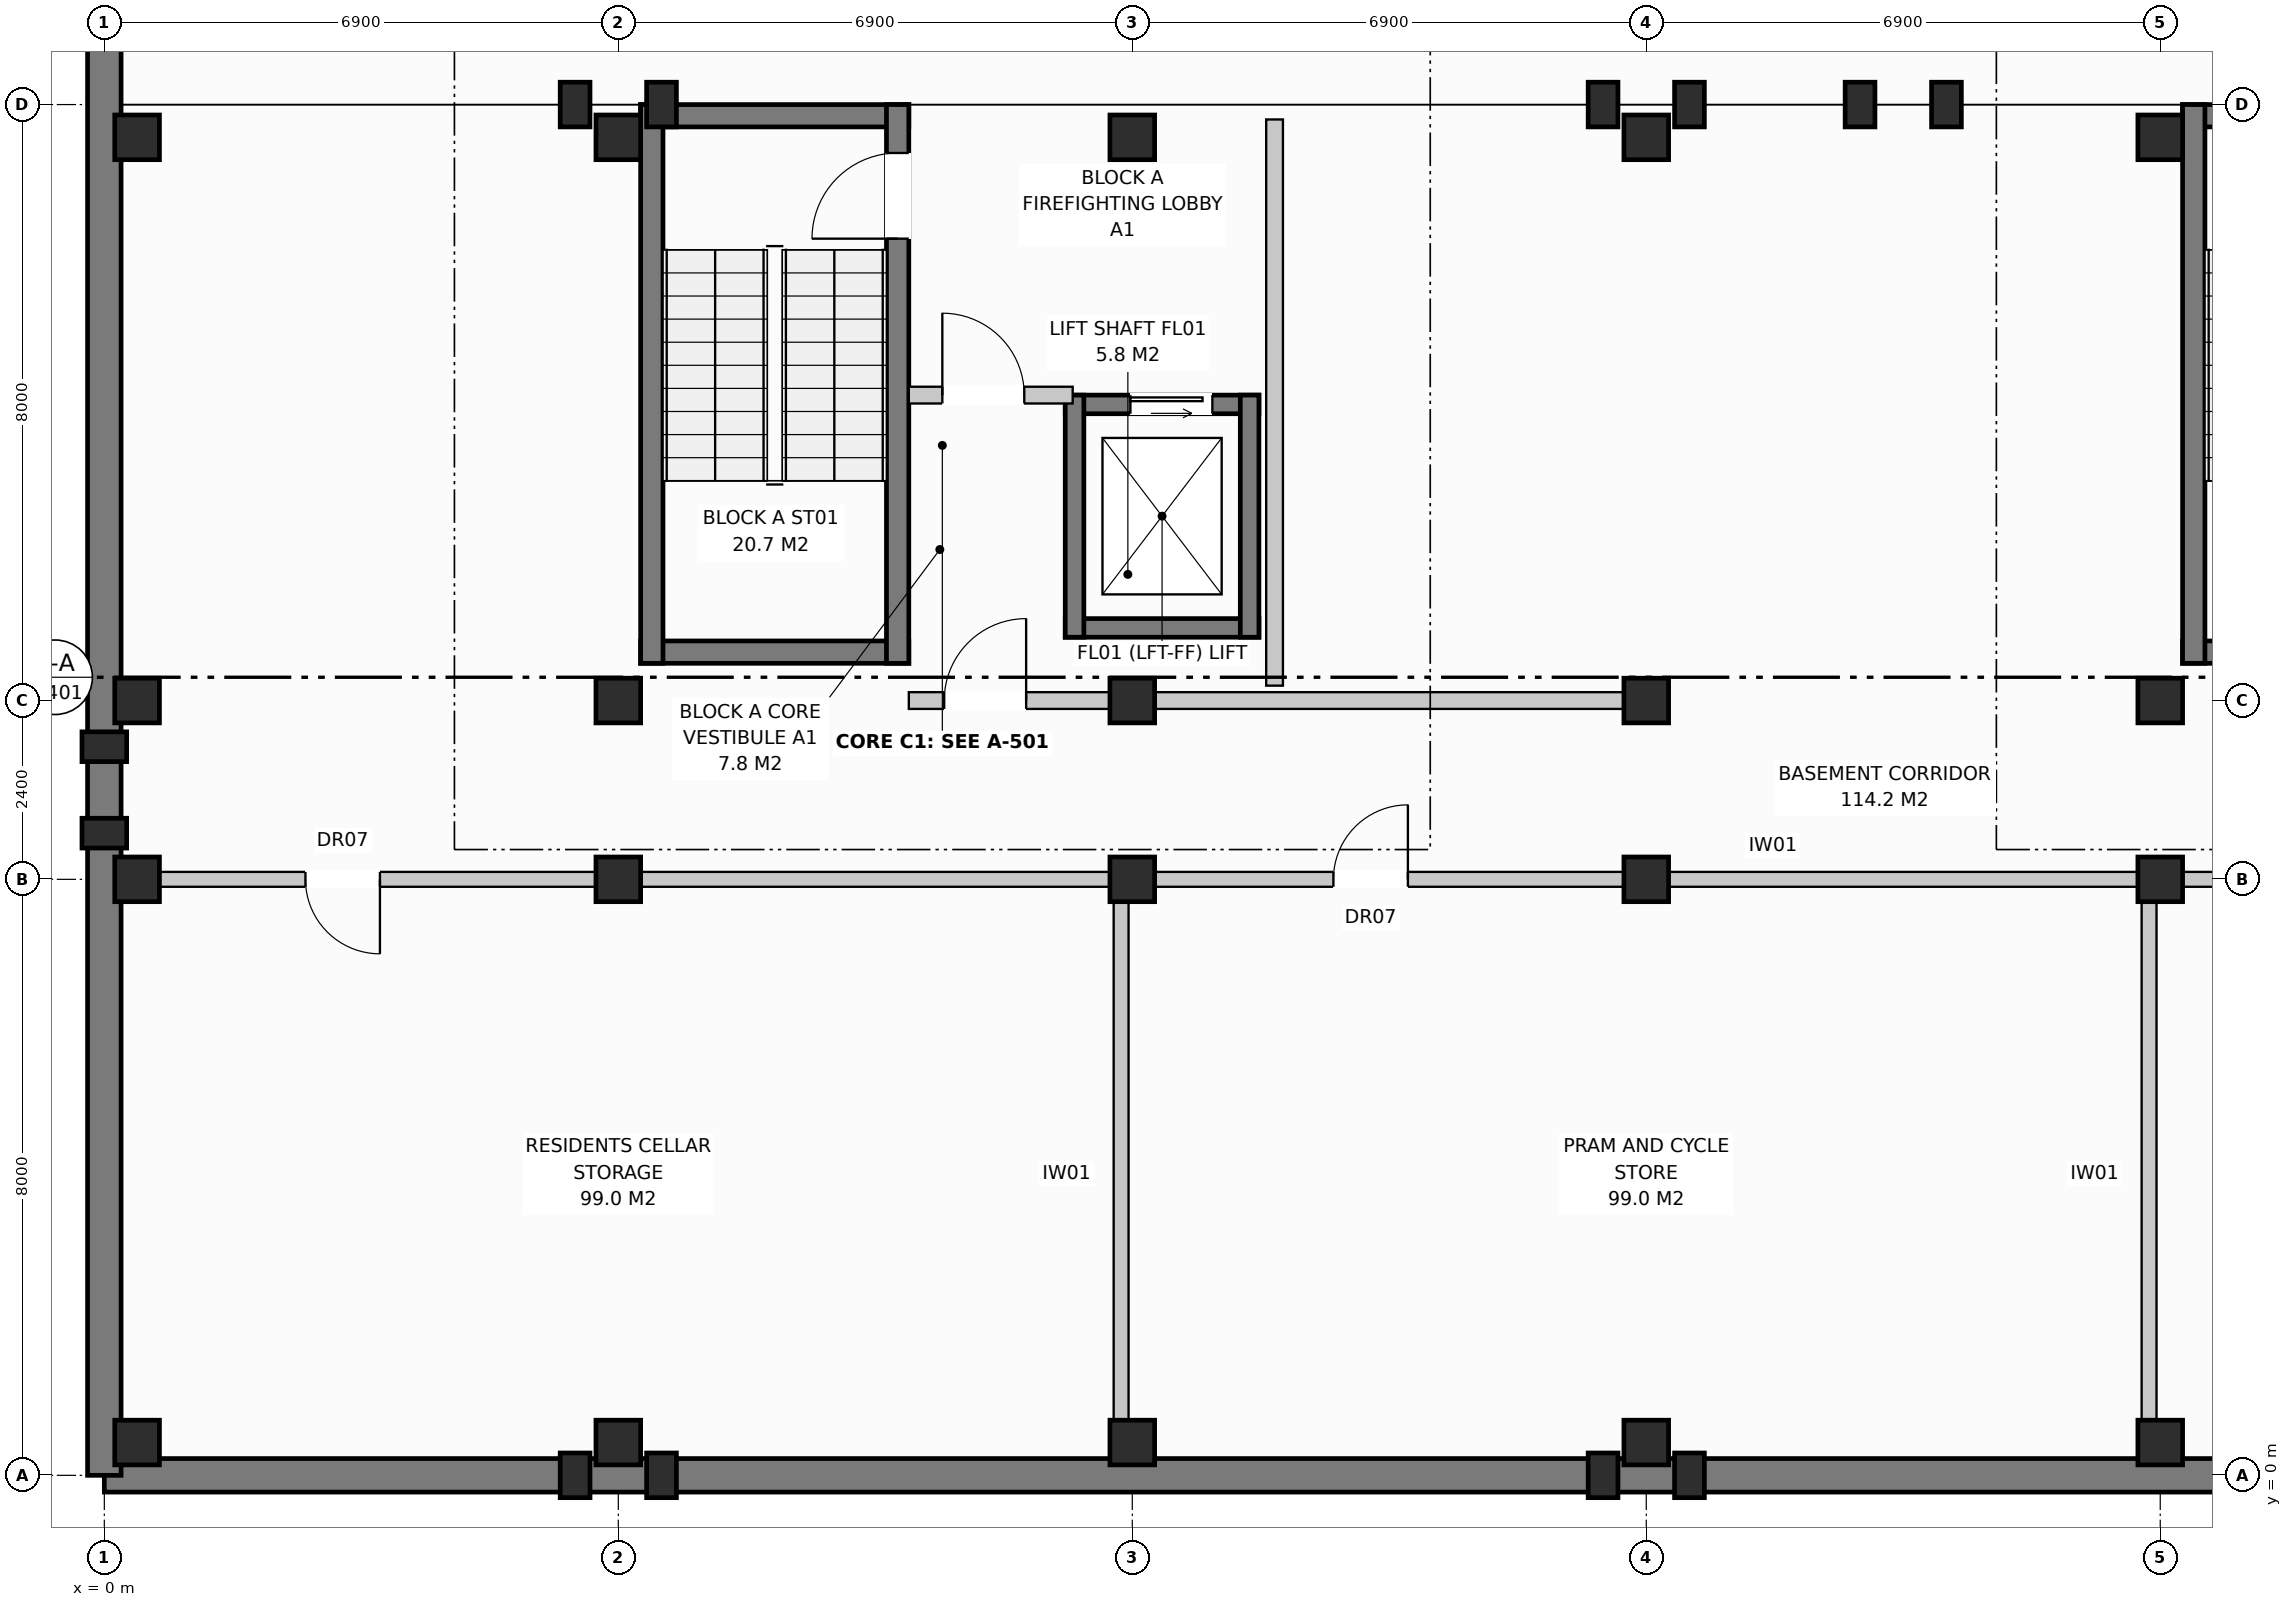
"""IFC4 building model, lengths in metres.
Left out: names, types, materials, properties, quantities, classifications, styles, units other than length and angle.
Written with IfcOpenShell. Run it as: python <this file> out.ifc"""

import sys

from ifc_helpers import new_model, si_unit, direction, frame, frame_2d, origin, origin_with_axes, origin_2d, place, context, subcontext, project, spatial, rectangle, extrude, element, fill, save


model = new_model("IFC4")
c1 = context("Model", 3, precision=1e-05, world=origin(), true_north=direction((0.0, 1.0)))
c2 = subcontext(c1, "Body", "Model", "MODEL_VIEW")
j1 = project(units=[si_unit("LENGTHUNIT", "METRE"), si_unit("PLANEANGLEUNIT", "RADIAN")], contexts=[c1])
p1 = place(None, origin())
s1 = spatial("IfcSite", under=j1, at=p1, CompositionType="ELEMENT")
p2 = place(p1, origin())
s2 = spatial("IfcBuilding", under=s1, at=p2, CompositionType="ELEMENT")
p3 = place(p2, frame((0.0, 0.0, -3.8)))
s3 = spatial("IfcBuildingStorey", under=s2, at=p3, CompositionType="ELEMENT", Elevation=-3.8)
for number, where, z_axis, x_axis in (
    (1, (0.44, 0.44, 0.0), (0.0, 0.0, 1.0), (1.0, 0.0, 0.0)),
    (2, (0.44, 8.0, 0.0), (0.0, 0.0, 1.0), (1.0, 0.0, 0.0)),
    (3, (0.44, 10.4, 0.0), (0.0, 0.0, 1.0), (1.0, 0.0, 0.0)),
    (4, (0.44, 17.96, 0.0), (0.0, 0.0, 1.0), (1.0, 0.0, 0.0)),
    (5, (6.9, 0.44, 0.0), (0.0, 0.0, 1.0), (1.0, 0.0, 0.0)),
    (6, (6.9, 8.0, 0.0), (0.0, 0.0, 1.0), (1.0, 0.0, 0.0)),
    (7, (6.9, 10.4, 0.0), (0.0, 0.0, 1.0), (1.0, 0.0, 0.0)),
    (8, (6.9, 17.96, 0.0), (0.0, 0.0, 1.0), (1.0, 0.0, 0.0)),
    (9, (13.8, 0.44, 0.0), (0.0, 0.0, 1.0), (1.0, 0.0, 0.0)),
    (10, (13.8, 8.0, 0.0), (0.0, 0.0, 1.0), (1.0, 0.0, 0.0)),
    (11, (13.8, 10.4, 0.0), (0.0, 0.0, 1.0), (1.0, 0.0, 0.0)),
    (12, (13.8, 17.96, 0.0), (0.0, 0.0, 1.0), (1.0, 0.0, 0.0)),
    (13, (20.7, 0.44, 0.0), (0.0, 0.0, 1.0), (1.0, 0.0, 0.0)),
    (14, (20.7, 8.0, 0.0), (0.0, 0.0, 1.0), (1.0, 0.0, 0.0)),
    (15, (20.7, 10.4, 0.0), (0.0, 0.0, 1.0), (1.0, 0.0, 0.0)),
    (16, (20.7, 17.96, 0.0), (0.0, 0.0, 1.0), (1.0, 0.0, 0.0)),
    (17, (27.6, 0.44, 0.0), (0.0, 0.0, 1.0), (1.0, 0.0, 0.0)),
    (18, (27.6, 8.0, 0.0), (0.0, 0.0, 1.0), (1.0, 0.0, 0.0)),
    (19, (27.6, 10.4, 0.0), (0.0, 0.0, 1.0), (1.0, 0.0, 0.0)),
    (20, (27.6, 17.96, 0.0), (0.0, 0.0, 1.0), (1.0, 0.0, 0.0)),
):
    element("IfcColumn", number, at=place(p3, frame(where, z_axis=z_axis, x_axis=x_axis)), inside=s3, PredefinedType="COLUMN", context=c2, shape_type="SweptSolid", body=[
        extrude(rectangle(XDim=0.6, YDim=0.6, at=origin_2d()), origin(), (0.0, 0.0, 1.0), 3.8),
    ])
for number, where, z_axis, x_axis in (
    (21, (6.32, 0.0, 0.0), (0.0, 0.0, 1.0), (1.0, 0.0, 0.0)),
    (22, (6.32, 18.4, 0.0), (0.0, 0.0, 1.0), (1.0, 0.0, 0.0)),
    (23, (7.48, 0.0, 0.0), (0.0, 0.0, 1.0), (1.0, 0.0, 0.0)),
    (24, (7.48, 18.4, 0.0), (0.0, 0.0, 1.0), (1.0, 0.0, 0.0)),
    (25, (20.12, 0.0, 0.0), (0.0, 0.0, 1.0), (1.0, 0.0, 0.0)),
    (26, (20.12, 18.4, 0.0), (0.0, 0.0, 1.0), (1.0, 0.0, 0.0)),
    (27, (21.28, 0.0, 0.0), (0.0, 0.0, 1.0), (1.0, 0.0, 0.0)),
    (28, (21.28, 18.4, 0.0), (0.0, 0.0, 1.0), (1.0, 0.0, 0.0)),
    (29, (23.57, 18.4, 0.0), (0.0, 0.0, 1.0), (1.0, 0.0, 0.0)),
    (30, (24.73, 18.4, 0.0), (0.0, 0.0, 1.0), (1.0, 0.0, 0.0)),
    (31, (0.0, 8.62, 0.0), (0.0, 0.0, 1.0), (0.0, 1.0, 0.0)),
    (32, (0.0, 9.78, 0.0), (0.0, 0.0, 1.0), (0.0, 1.0, 0.0)),
):
    element("IfcColumn", number, at=place(p3, frame(where, z_axis=z_axis, x_axis=x_axis)), inside=s3, PredefinedType="PILASTER", context=c2, shape_type="SweptSolid", body=[
        extrude(rectangle(XDim=0.4, YDim=0.6, at=origin_2d()), origin(), (0.0, 0.0, 1.0), 3.8),
    ])
p4 = place(p3, origin_with_axes())
e33 = element("IfcWall", 33, at=p4, inside=s3, PredefinedType="STANDARD", context=c2, shape_type="SweptSolid", body=[
    extrude(rectangle(XDim=168.0, YDim=0.45, at=frame_2d((84.0, 0.0))), origin(), (0.0, 0.0, 1.0), 3.48),
])
p5 = place(p3, frame((0.0, 116.0, 0.0), z_axis=(0.0, 0.0, 1.0), x_axis=(0.0, -1.0, 0.0)))
e34 = element("IfcWall", 34, at=p5, inside=s3, PredefinedType="STANDARD", context=c2, shape_type="SweptSolid", body=[
    extrude(rectangle(XDim=116.0, YDim=0.45, at=frame_2d((58.0, 0.0))), origin(), (0.0, 0.0, 1.0), 3.48),
])
for number, where, z_axis, x_axis in (
    (35, (7.2, 18.25, 0.0), (0.0, 0.0, 1.0), (1.0, 0.0, 0.0)),
    (36, (7.2, 11.05, 0.0), (0.0, 0.0, 1.0), (1.0, 0.0, 0.0)),
):
    element("IfcWall", number, at=place(p3, frame(where, z_axis=z_axis, x_axis=x_axis)), inside=s3, PredefinedType="SHEAR", context=c2, shape_type="SweptSolid", body=[
        extrude(rectangle(XDim=3.6, YDim=0.3, at=frame_2d((1.8, 0.0))), origin(), (0.0, 0.0, 1.0), 3.48),
    ])
p6 = place(p3, frame((7.35, 10.9, 0.0), z_axis=(0.0, 0.0, 1.0), x_axis=(0.0, 1.0, 0.0)))
e37 = element("IfcWall", 37, at=p6, inside=s3, PredefinedType="SHEAR", context=c2, shape_type="SweptSolid", body=[
    extrude(rectangle(XDim=7.5, YDim=0.3, at=frame_2d((3.75, 0.0))), origin(), (0.0, 0.0, 1.0), 3.48),
])
p7 = place(p3, frame((10.65, 10.9, 0.0), z_axis=(0.0, 0.0, 1.0), x_axis=(0.0, 1.0, 0.0)))
e38 = element("IfcWall", 38, at=p7, inside=s3, PredefinedType="SHEAR", context=c2, shape_type="SweptSolid", body=[
    extrude(rectangle(XDim=7.5, YDim=0.3, at=frame_2d((3.75, 0.0))), origin(), (0.0, 0.0, 1.0), 3.48),
])
p8 = place(p7, frame((5.7, 0.0, 0.0)))
e39 = element("IfcOpeningElement", 39, at=p8, cuts=e38, PredefinedType="OPENING", context=c2, shape_type="SweptSolid", body=[
    extrude(rectangle(XDim=1.15, YDim=2.15, at=frame_2d((0.575, 1.075))), frame((0.0, 0.162, 0.0), z_axis=(0.0, -1.0, 0.0), x_axis=(1.0, 0.0, 0.0)), (0.0, 0.0, 1.0), 0.324),
])
p9 = place(p3, frame((12.9, 14.375, 0.0), z_axis=(0.0, 0.0, 1.0), x_axis=(1.0, 0.0, 0.0)))
e40 = element("IfcWall", 40, at=p9, inside=s3, PredefinedType="SHEAR", context=c2, shape_type="SweptSolid", body=[
    extrude(rectangle(XDim=2.6, YDim=0.25, at=frame_2d((1.3, 0.0))), origin(), (0.0, 0.0, 1.0), 3.48),
])
p10 = place(p9, frame((0.875, 0.0, 0.0)))
e41 = element("IfcOpeningElement", 41, at=p10, cuts=e40, PredefinedType="OPENING", context=c2, shape_type="SweptSolid", body=[
    extrude(rectangle(XDim=1.1, YDim=2.1, at=frame_2d((0.55, 1.05))), frame((0.0, 0.137, 0.0), z_axis=(0.0, -1.0, 0.0), x_axis=(1.0, 0.0, 0.0)), (0.0, 0.0, 1.0), 0.274),
])
p11 = place(p3, frame((12.9, 11.375, 0.0), z_axis=(0.0, 0.0, 1.0), x_axis=(1.0, 0.0, 0.0)))
e42 = element("IfcWall", 42, at=p11, inside=s3, PredefinedType="SHEAR", context=c2, shape_type="SweptSolid", body=[
    extrude(rectangle(XDim=2.6, YDim=0.25, at=frame_2d((1.3, 0.0))), origin(), (0.0, 0.0, 1.0), 3.48),
])
for number, where, z_axis, x_axis in (
    (43, (13.025, 11.25, 0.0), (0.0, 0.0, 1.0), (0.0, 1.0, 0.0)),
    (44, (15.375, 11.25, 0.0), (0.0, 0.0, 1.0), (0.0, 1.0, 0.0)),
):
    element("IfcWall", number, at=place(p3, frame(where, z_axis=z_axis, x_axis=x_axis)), inside=s3, PredefinedType="SHEAR", context=c2, shape_type="SweptSolid", body=[
        extrude(rectangle(XDim=3.25, YDim=0.25, at=frame_2d((1.625, 0.0))), origin(), (0.0, 0.0, 1.0), 3.48),
    ])
p12 = place(p3, frame((15.71, 10.6, 0.0), z_axis=(0.0, 0.0, 1.0), x_axis=(0.0, 1.0, 0.0)))
e45 = element("IfcWall", 45, at=p12, inside=s3, PredefinedType="PARTITIONING", context=c2, shape_type="SweptSolid", body=[
    extrude(rectangle(XDim=7.6, YDim=0.225, at=frame_2d((3.8, 0.0))), origin(), (0.0, 0.0, 1.0), 3.19),
])
p13 = place(p3, frame((10.8, 14.5, 0.0), z_axis=(0.0, 0.0, 1.0), x_axis=(1.0, 0.0, 0.0)))
e46 = element("IfcWall", 46, at=p13, inside=s3, PredefinedType="PARTITIONING", context=c2, shape_type="SweptSolid", body=[
    extrude(rectangle(XDim=2.2, YDim=0.225, at=frame_2d((1.1, 0.0))), origin(), (0.0, 0.0, 1.0), 3.48),
])
p14 = place(p13, frame((0.45, 0.0, 0.0)))
e47 = element("IfcOpeningElement", 47, at=p14, cuts=e46, PredefinedType="OPENING", context=c2, shape_type="SweptSolid", body=[
    extrude(rectangle(XDim=1.1, YDim=2.15, at=frame_2d((0.55, 1.075))), frame((0.0, 0.125, 0.0), z_axis=(0.0, -1.0, 0.0), x_axis=(1.0, 0.0, 0.0)), (0.0, 0.0, 1.0), 0.249),
])
p15 = place(p3, frame((6.9, 10.4, 0.0), z_axis=(0.0, 0.0, 1.0), x_axis=(1.0, 0.0, 0.0)))
e48 = element("IfcWall", 48, at=p15, inside=s3, PredefinedType="PARTITIONING", context=c2, shape_type="SweptSolid", body=[
    extrude(rectangle(XDim=0.3, YDim=0.225, at=frame_2d((0.15, 0.0))), origin(), (0.0, 0.0, 1.0), 3.48),
])
p16 = place(p3, frame((10.8, 10.4, 0.0), z_axis=(0.0, 0.0, 1.0), x_axis=(1.0, 0.0, 0.0)))
e49 = element("IfcWall", 49, at=p16, inside=s3, PredefinedType="PARTITIONING", context=c2, shape_type="SweptSolid", body=[
    extrude(rectangle(XDim=9.9, YDim=0.225, at=frame_2d((4.95, 0.0))), origin(), (0.0, 0.0, 1.0), 2.92),
])
p17 = place(p16, frame((0.475, 0.0, 0.0)))
e50 = element("IfcOpeningElement", 50, at=p17, cuts=e49, PredefinedType="OPENING", context=c2, shape_type="SweptSolid", body=[
    extrude(rectangle(XDim=1.1, YDim=2.15, at=frame_2d((0.55, 1.075))), frame((0.0, 0.125, 0.0), z_axis=(0.0, -1.0, 0.0), x_axis=(1.0, 0.0, 0.0)), (0.0, 0.0, 1.0), 0.249),
])
for number, where, z_axis, x_axis in (
    (51, (27.9, 18.25, 0.0), (0.0, 0.0, 1.0), (1.0, 0.0, 0.0)),
    (52, (27.9, 11.05, 0.0), (0.0, 0.0, 1.0), (1.0, 0.0, 0.0)),
):
    element("IfcWall", number, at=place(p3, frame(where, z_axis=z_axis, x_axis=x_axis)), inside=s3, PredefinedType="SHEAR", context=c2, shape_type="SweptSolid", body=[
        extrude(rectangle(XDim=3.6, YDim=0.3, at=frame_2d((1.8, 0.0))), origin(), (0.0, 0.0, 1.0), 3.48),
    ])
p18 = place(p3, frame((28.05, 10.9, 0.0), z_axis=(0.0, 0.0, 1.0), x_axis=(0.0, 1.0, 0.0)))
e53 = element("IfcWall", 53, at=p18, inside=s3, PredefinedType="SHEAR", context=c2, shape_type="SweptSolid", body=[
    extrude(rectangle(XDim=7.5, YDim=0.3, at=frame_2d((3.75, 0.0))), origin(), (0.0, 0.0, 1.0), 3.48),
])
p19 = place(p3, frame((27.6, 10.4, 0.0), z_axis=(0.0, 0.0, 1.0), x_axis=(1.0, 0.0, 0.0)))
e54 = element("IfcWall", 54, at=p19, inside=s3, PredefinedType="PARTITIONING", context=c2, shape_type="SweptSolid", body=[
    extrude(rectangle(XDim=0.3, YDim=0.225, at=frame_2d((0.15, 0.0))), origin(), (0.0, 0.0, 1.0), 3.48),
])
p20 = place(p3, frame((0.3, 8.0, 0.0), z_axis=(0.0, 0.0, 1.0), x_axis=(1.0, 0.0, 0.0)))
e55 = element("IfcWall", 55, at=p20, inside=s3, PredefinedType="PARTITIONING", context=c2, shape_type="SweptSolid", body=[
    extrude(rectangle(XDim=13.2, YDim=0.2, at=frame_2d((6.6, 0.0))), origin(), (0.0, 0.0, 1.0), 2.92),
])
p21 = place(p20, frame((2.4, 0.0, 0.0)))
e56 = element("IfcOpeningElement", 56, at=p21, cuts=e55, PredefinedType="OPENING", context=c2, shape_type="SweptSolid", body=[
    extrude(rectangle(XDim=1.0, YDim=2.15, at=frame_2d((0.5, 1.075))), frame((0.0, 0.112, 0.0), z_axis=(0.0, -1.0, 0.0), x_axis=(1.0, 0.0, 0.0)), (0.0, 0.0, 1.0), 0.224),
])
p22 = place(p3, frame((13.65, 0.3, 0.0), z_axis=(0.0, 0.0, 1.0), x_axis=(0.0, 1.0, 0.0)))
e57 = element("IfcWall", 57, at=p22, inside=s3, PredefinedType="PARTITIONING", context=c2, shape_type="SweptSolid", body=[
    extrude(rectangle(XDim=7.5, YDim=0.2, at=frame_2d((3.75, 0.0))), origin(), (0.0, 0.0, 1.0), 3.48),
])
p23 = place(p3, frame((14.1, 8.0, 0.0), z_axis=(0.0, 0.0, 1.0), x_axis=(1.0, 0.0, 0.0)))
e58 = element("IfcWall", 58, at=p23, inside=s3, PredefinedType="PARTITIONING", context=c2, shape_type="SweptSolid", body=[
    extrude(rectangle(XDim=13.2, YDim=0.2, at=frame_2d((6.6, 0.0))), origin(), (0.0, 0.0, 1.0), 2.92),
])
p24 = place(p23, frame((2.4, 0.0, 0.0)))
e59 = element("IfcOpeningElement", 59, at=p24, cuts=e58, PredefinedType="OPENING", context=c2, shape_type="SweptSolid", body=[
    extrude(rectangle(XDim=1.0, YDim=2.15, at=frame_2d((0.5, 1.075))), frame((0.0, 0.112, 0.0), z_axis=(0.0, -1.0, 0.0), x_axis=(1.0, 0.0, 0.0)), (0.0, 0.0, 1.0), 0.224),
])
p25 = place(p3, frame((27.45, 0.3, 0.0), z_axis=(0.0, 0.0, 1.0), x_axis=(0.0, 1.0, 0.0)))
e60 = element("IfcWall", 60, at=p25, inside=s3, PredefinedType="PARTITIONING", context=c2, shape_type="SweptSolid", body=[
    extrude(rectangle(XDim=7.5, YDim=0.2, at=frame_2d((3.75, 0.0))), origin(), (0.0, 0.0, 1.0), 3.48),
])
p26 = place(p3, frame((27.9, 8.0, 0.0), z_axis=(0.0, 0.0, 1.0), x_axis=(1.0, 0.0, 0.0)))
e61 = element("IfcWall", 61, at=p26, inside=s3, PredefinedType="PARTITIONING", context=c2, shape_type="SweptSolid", body=[
    extrude(rectangle(XDim=13.2, YDim=0.2, at=frame_2d((6.6, 0.0))), origin(), (0.0, 0.0, 1.0), 2.92),
])
p27 = place(p26, frame((2.4, 0.0, 0.0)))
e62 = element("IfcOpeningElement", 62, at=p27, cuts=e61, PredefinedType="OPENING", context=c2, shape_type="SweptSolid", body=[
    extrude(rectangle(XDim=1.0, YDim=2.15, at=frame_2d((0.5, 1.075))), frame((0.0, 0.112, 0.0), z_axis=(0.0, -1.0, 0.0), x_axis=(1.0, 0.0, 0.0)), (0.0, 0.0, 1.0), 0.224),
])
p28 = place(p8, origin_with_axes())
e63 = element("IfcDoor", 63, at=p28, inside=s3, OperationType="SINGLE_SWING_LEFT", PredefinedType="DOOR", context=c2, shape_type="SweptSolid", body=[
    extrude(rectangle(XDim=1.15, YDim=2.15, at=frame_2d((0.575, 1.075))), frame((0.0, 0.025, 0.0), z_axis=(0.0, -1.0, 0.0), x_axis=(1.0, 0.0, 0.0)), (0.0, 0.0, 1.0), 0.05),
])
fill(e39, e63)
p29 = place(p10, origin_with_axes())
e64 = element("IfcDoor", 64, at=p29, inside=s3, OperationType="SLIDING_TO_LEFT", PredefinedType="DOOR", context=c2, shape_type="SweptSolid", body=[
    extrude(rectangle(XDim=1.1, YDim=2.1, at=frame_2d((0.55, 1.05))), frame((0.0, 0.025, 0.0), z_axis=(0.0, -1.0, 0.0), x_axis=(1.0, 0.0, 0.0)), (0.0, 0.0, 1.0), 0.05),
])
fill(e41, e64)
p30 = place(p14, origin_with_axes())
e65 = element("IfcDoor", 65, at=p30, inside=s3, OperationType="SINGLE_SWING_LEFT", PredefinedType="DOOR", context=c2, shape_type="SweptSolid", body=[
    extrude(rectangle(XDim=1.1, YDim=2.15, at=frame_2d((0.55, 1.075))), frame((0.0, 0.025, 0.0), z_axis=(0.0, -1.0, 0.0), x_axis=(1.0, 0.0, 0.0)), (0.0, 0.0, 1.0), 0.05),
])
fill(e47, e65)
p31 = place(p17, origin_with_axes())
e66 = element("IfcDoor", 66, at=p31, inside=s3, OperationType="SINGLE_SWING_RIGHT", PredefinedType="DOOR", context=c2, shape_type="SweptSolid", body=[
    extrude(rectangle(XDim=1.1, YDim=2.15, at=frame_2d((0.55, 1.075))), frame((0.0, 0.025, 0.0), z_axis=(0.0, -1.0, 0.0), x_axis=(1.0, 0.0, 0.0)), (0.0, 0.0, 1.0), 0.05),
])
fill(e50, e66)
p32 = place(p21, frame((1.0, 0.0, 0.0), z_axis=(0.0, 0.0, 1.0), x_axis=(-1.0, 0.0, 0.0)))
e67 = element("IfcDoor", 67, at=p32, inside=s3, OperationType="SINGLE_SWING_RIGHT", PredefinedType="DOOR", context=c2, shape_type="SweptSolid", body=[
    extrude(rectangle(XDim=1.0, YDim=2.15, at=frame_2d((0.5, 1.075))), frame((0.0, 0.025, 0.0), z_axis=(0.0, -1.0, 0.0), x_axis=(1.0, 0.0, 0.0)), (0.0, 0.0, 1.0), 0.05),
])
fill(e56, e67)
p33 = place(p24, origin_with_axes())
e68 = element("IfcDoor", 68, at=p33, inside=s3, OperationType="SINGLE_SWING_RIGHT", PredefinedType="DOOR", context=c2, shape_type="SweptSolid", body=[
    extrude(rectangle(XDim=1.0, YDim=2.15, at=frame_2d((0.5, 1.075))), frame((0.0, 0.025, 0.0), z_axis=(0.0, -1.0, 0.0), x_axis=(1.0, 0.0, 0.0)), (0.0, 0.0, 1.0), 0.05),
])
fill(e59, e68)
save(model, sys.argv[1])
